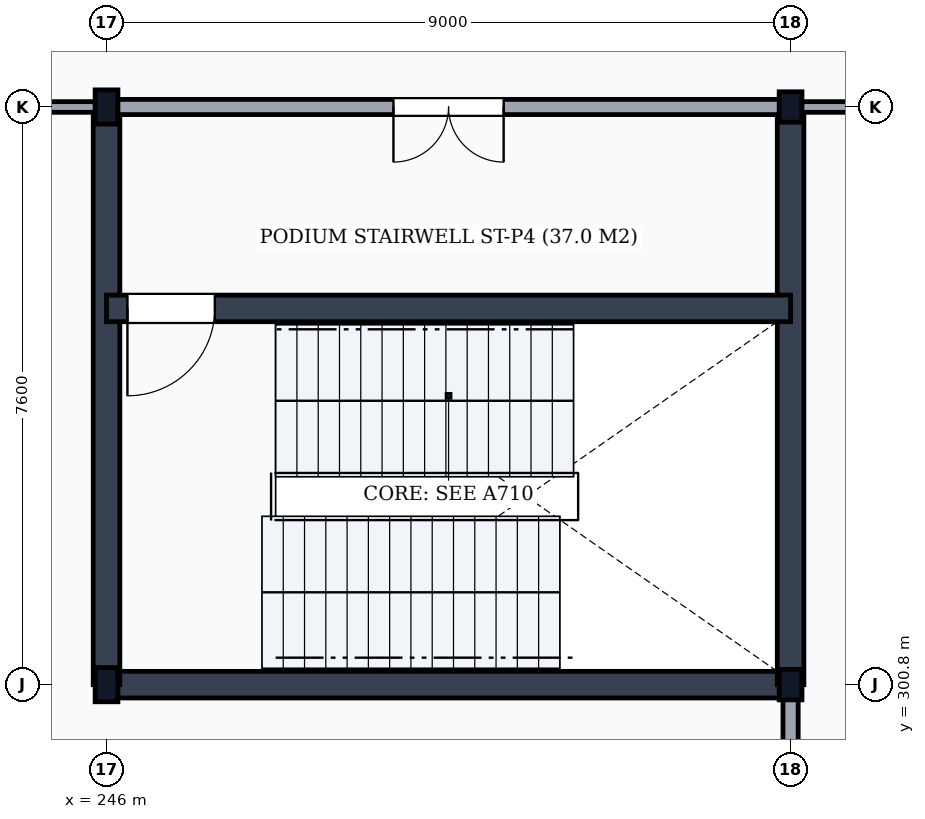
"""IFC4 building model, lengths in metres.
Left out: names, types, materials, properties, quantities, classifications, styles, units other than length and angle.
Written with IfcOpenShell. Run it as: python <this file> out.ifc"""

import sys

from ifc_helpers import new_model, si_unit, direction, frame, frame_2d, origin, origin_2d, place, context, subcontext, project, spatial, rectangle, i_section, extrude, element, fill, save


model = new_model("IFC4")
c1 = context("Model", 3, precision=1e-05, world=origin(), true_north=direction((0.0, 1.0)))
c2 = subcontext(c1, "Body", "Model", "MODEL_VIEW")
j1 = project(units=[si_unit("LENGTHUNIT", "METRE"), si_unit("PLANEANGLEUNIT", "RADIAN")], contexts=[c1])
p1 = place(None, origin())
s1 = spatial("IfcSite", under=j1, at=p1, CompositionType="ELEMENT")
p2 = place(p1, origin())
s2 = spatial("IfcBuilding", under=s1, at=p2, CompositionType="ELEMENT")
p3 = place(p2, frame((0.0, 0.0, 5.4)))
s3 = spatial("IfcBuildingStorey", under=s2, at=p3, CompositionType="ELEMENT", Elevation=5.4)
for number, where, z_axis, x_axis in (
    (1, (246.0, 300.8, 0.0), (0.0, 0.0, 1.0), (1.0, 0.0, 0.0)),
    (2, (246.0, 308.4, 0.0), (0.0, 0.0, 1.0), (1.0, 0.0, 0.0)),
):
    element("IfcColumn", number, at=place(p3, frame(where, z_axis=z_axis, x_axis=x_axis)), inside=s3, PredefinedType="COLUMN", context=c2, shape_type="SweptSolid", body=[
        extrude(i_section(OverallWidth=0.3, OverallDepth=0.45, WebThickness=0.014, FlangeThickness=0.026, FilletRadius=0.027, at=origin_2d()), origin(), (0.0, 0.0, 1.0), 5.1),
    ])
for number, where, z_axis, x_axis in (
    (3, (255.0, 300.8, 0.0), (0.0, 0.0, 1.0), (1.0, 0.0, 0.0)),
    (4, (255.0, 308.4, 0.0), (0.0, 0.0, 1.0), (1.0, 0.0, 0.0)),
):
    element("IfcColumn", number, at=place(p3, frame(where, z_axis=z_axis, x_axis=x_axis)), inside=s3, PredefinedType="COLUMN", context=c2, shape_type="SweptSolid", body=[
        extrude(i_section(OverallWidth=0.3, OverallDepth=0.4, WebThickness=0.013, FlangeThickness=0.024, FilletRadius=0.027, at=origin_2d()), origin(), (0.0, 0.0, 1.0), 5.1),
    ])
p4 = place(p3, frame((246.0, 300.8, 0.0), z_axis=(0.0, 0.0, 1.0), x_axis=(1.0, 0.0, 0.0)))
e5 = element("IfcWall", 5, at=p4, inside=s3, PredefinedType="SHEAR", context=c2, shape_type="SweptSolid", body=[
    extrude(rectangle(XDim=9.0, YDim=0.35, at=frame_2d((4.5, 0.0))), origin(), (0.0, 0.0, 1.0), 4.86),
])
for number, where, z_axis, x_axis in (
    (6, (246.0, 300.8, 0.0), (0.0, 0.0, 1.0), (0.0, 1.0, 0.0)),
    (7, (255.0, 300.8, 0.0), (0.0, 0.0, 1.0), (0.0, 1.0, 0.0)),
):
    element("IfcWall", number, at=place(p3, frame(where, z_axis=z_axis, x_axis=x_axis)), inside=s3, PredefinedType="SHEAR", context=c2, shape_type="SweptSolid", body=[
        extrude(rectangle(XDim=7.6, YDim=0.35, at=frame_2d((3.8, 0.0))), origin(), (0.0, 0.0, 1.0), 4.86),
    ])
p5 = place(p3, frame((246.0, 305.75, 0.0), z_axis=(0.0, 0.0, 1.0), x_axis=(1.0, 0.0, 0.0)))
e8 = element("IfcWall", 8, at=p5, inside=s3, PredefinedType="SHEAR", context=c2, shape_type="SweptSolid", body=[
    extrude(rectangle(XDim=9.0, YDim=0.35, at=frame_2d((4.5, 0.0))), origin(), (0.0, 0.0, 1.0), 4.86),
])
p6 = place(p5, frame((0.275, 0.0, 0.0)))
e9 = element("IfcOpeningElement", 9, at=p6, cuts=e8, PredefinedType="OPENING", context=c2, shape_type="SweptSolid", body=[
    extrude(rectangle(XDim=1.15, YDim=2.15, at=frame_2d((0.575, 1.075))), frame((0.0, 0.19, 0.0), z_axis=(0.0, -1.0, 0.0), x_axis=(1.0, 0.0, 0.0)), (0.0, 0.0, 1.0), 0.38),
])
p7 = place(p3, frame((246.0, 308.4, 0.0), z_axis=(0.0, 0.0, 1.0), x_axis=(1.0, 0.0, 0.0)))
e10 = element("IfcWall", 10, at=p7, inside=s3, PredefinedType="PARTITIONING", context=c2, shape_type="SweptSolid", body=[
    extrude(rectangle(XDim=9.0, YDim=0.2, at=frame_2d((4.5, 0.0))), origin(), (0.0, 0.0, 1.0), 4.308),
])
p8 = place(p7, frame((3.775, 0.0, 0.0)))
e11 = element("IfcOpeningElement", 11, at=p8, cuts=e10, PredefinedType="OPENING", context=c2, shape_type="SweptSolid", body=[
    extrude(rectangle(XDim=1.45, YDim=2.2, at=frame_2d((0.725, 1.1))), frame((0.0, 0.115, 0.0), z_axis=(0.0, -1.0, 0.0), x_axis=(1.0, 0.0, 0.0)), (0.0, 0.0, 1.0), 0.23),
])
p9 = place(p3, frame((255.0, 258.2, 0.0), z_axis=(0.0, 0.0, 1.0), x_axis=(0.0, 1.0, 0.0)))
e12 = element("IfcWall", 12, at=p9, inside=s3, PredefinedType="PARTITIONING", context=c2, shape_type="SweptSolid", body=[
    extrude(rectangle(XDim=42.6, YDim=0.2, at=frame_2d((21.3, 0.0))), origin(), (0.0, 0.0, 1.0), 1.908),
])
p10 = place(p9, frame((5.2, 0.0, 0.0)))
e13 = element("IfcOpeningElement", 13, at=p10, cuts=e12, PredefinedType="OPENING", context=c2, shape_type="SweptSolid", body=[
    extrude(rectangle(XDim=1.6, YDim=2.25, at=frame_2d((0.8, 1.125))), frame((0.0, 0.115, 0.0), z_axis=(0.0, -1.0, 0.0), x_axis=(1.0, 0.0, 0.0)), (0.0, 0.0, 1.0), 0.23),
])
p11 = place(p3, frame((205.0, 308.4, 0.0), z_axis=(0.0, 0.0, 1.0), x_axis=(1.0, 0.0, 0.0)))
e14 = element("IfcWall", 14, at=p11, inside=s3, PredefinedType="PARTITIONING", context=c2, shape_type="SweptSolid", body=[
    extrude(rectangle(XDim=41.0, YDim=0.14, at=frame_2d((20.5, 0.0))), origin(), (0.0, 0.0, 1.0), 4.308),
])
p12 = place(p11, frame((21.66, 0.0, 0.0)))
e15 = element("IfcOpeningElement", 15, at=p12, cuts=e14, PredefinedType="OPENING", context=c2, shape_type="SweptSolid", body=[
    extrude(rectangle(XDim=1.8, YDim=2.4, at=frame_2d((0.9, 1.2))), frame((0.0, 0.085, 0.0), z_axis=(0.0, -1.0, 0.0), x_axis=(1.0, 0.0, 0.0)), (0.0, 0.0, 1.0), 0.17),
])
p13 = place(p3, frame((255.0, 308.4, 0.0), z_axis=(0.0, 0.0, 1.0), x_axis=(1.0, 0.0, 0.0)))
e16 = element("IfcWall", 16, at=p13, inside=s3, PredefinedType="PARTITIONING", context=c2, shape_type="SweptSolid", body=[
    extrude(rectangle(XDim=3.0, YDim=0.14, at=frame_2d((1.5, 0.0))), origin(), (0.0, 0.0, 1.0), 4.308),
])
p14 = place(p13, frame((0.95, 0.0, 0.0)))
e17 = element("IfcOpeningElement", 17, at=p14, cuts=e16, PredefinedType="OPENING", context=c2, shape_type="SweptSolid", body=[
    extrude(rectangle(XDim=1.1, YDim=2.1, at=frame_2d((0.55, 1.05))), frame((0.0, 0.085, 0.0), z_axis=(0.0, -1.0, 0.0), x_axis=(1.0, 0.0, 0.0)), (0.0, 0.0, 1.0), 0.17),
])
p15 = place(p6, frame((1.15, 0.0, 0.0), z_axis=(0.0, 0.0, 1.0), x_axis=(-1.0, 0.0, 0.0)))
e18 = element("IfcDoor", 18, at=p15, inside=s3, OperationType="SINGLE_SWING_RIGHT", PredefinedType="DOOR", context=c2, shape_type="SweptSolid", body=[
    extrude(rectangle(XDim=1.15, YDim=2.15, at=frame_2d((0.575, 1.075))), frame((0.0, 0.025, 0.0), z_axis=(0.0, -1.0, 0.0), x_axis=(1.0, 0.0, 0.0)), (0.0, 0.0, 1.0), 0.05),
])
fill(e9, e18)
p16 = place(p8, frame((1.45, 0.0, 0.0), z_axis=(0.0, 0.0, 1.0), x_axis=(-1.0, 0.0, 0.0)))
e19 = element("IfcDoor", 19, at=p16, inside=s3, OperationType="DOUBLE_DOOR_SINGLE_SWING", PredefinedType="DOOR", context=c2, shape_type="SweptSolid", body=[
    extrude(rectangle(XDim=1.45, YDim=2.2, at=frame_2d((0.725, 1.1))), frame((0.0, 0.025, 0.0), z_axis=(0.0, -1.0, 0.0), x_axis=(1.0, 0.0, 0.0)), (0.0, 0.0, 1.0), 0.05),
])
fill(e11, e19)
save(model, sys.argv[1])
